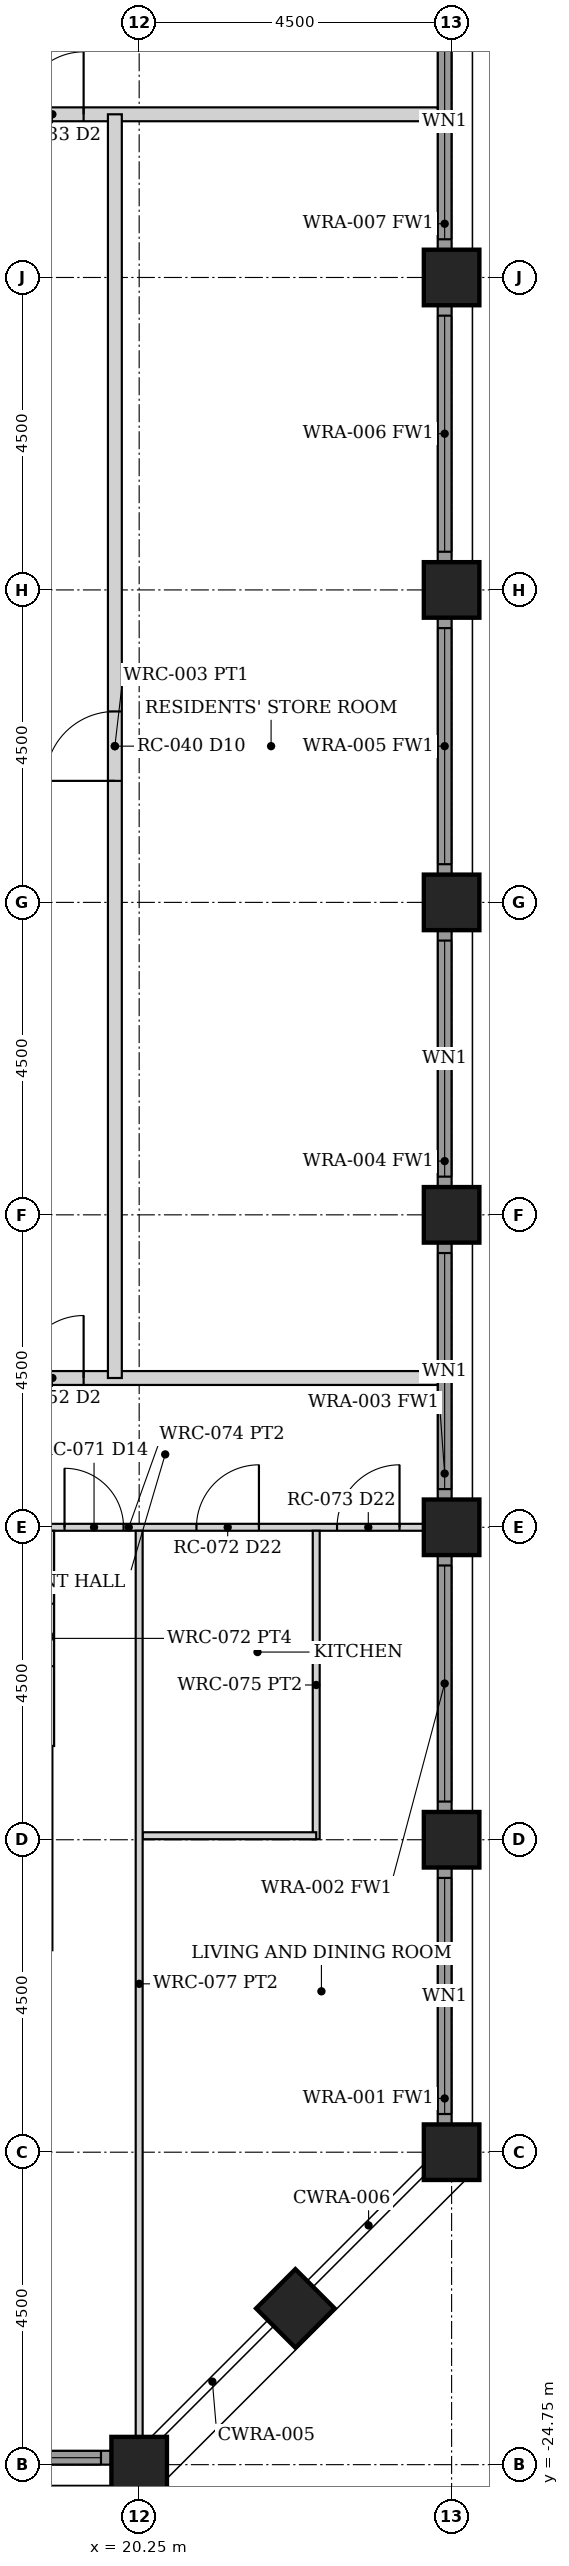
"""IFC4 building model, lengths in metres.
Left out: names, types, materials, properties, quantities, classifications, styles, units other than length and angle.
Written with IfcOpenShell. Run it as: python <this file> out.ifc"""

import sys

from ifc_helpers import new_model, si_unit, direction, frame, frame_2d, origin, origin_2d, place, context, subcontext, project, spatial, rectangle, hollow_rectangle, extrude, element, fill, save


model = new_model("IFC4")
c1 = context("Model", 3, precision=1e-05, world=origin(), true_north=direction((0.0, 1.0)))
c2 = subcontext(c1, "Body", "Model", "MODEL_VIEW")
j1 = project(units=[si_unit("LENGTHUNIT", "METRE"), si_unit("PLANEANGLEUNIT", "RADIAN")], contexts=[c1])
p1 = place(None, origin())
s1 = spatial("IfcSite", under=j1, at=p1, CompositionType="ELEMENT")
p2 = place(p1, origin())
s2 = spatial("IfcBuilding", under=s1, at=p2, CompositionType="ELEMENT")
p3 = place(p2, frame((0.0, 0.0, 47.5)))
s3 = spatial("IfcBuildingStorey", under=s2, at=p3, CompositionType="ELEMENT", Elevation=47.5)
for number, where, z_axis, x_axis in (
    (1, (24.75, -20.25, 0.0), (0.0, 0.0, 1.0), (1.0, 0.0, 0.0)),
    (2, (24.75, -15.75, 0.0), (0.0, 0.0, 1.0), (1.0, 0.0, 0.0)),
    (3, (24.75, -11.25, 0.0), (0.0, 0.0, 1.0), (1.0, 0.0, 0.0)),
    (4, (24.75, -6.75, 0.0), (0.0, 0.0, 1.0), (1.0, 0.0, 0.0)),
    (5, (24.75, -2.25, 0.0), (0.0, 0.0, 1.0), (1.0, 0.0, 0.0)),
    (6, (24.75, 2.25, 0.0), (0.0, 0.0, 1.0), (1.0, 0.0, 0.0)),
    (7, (24.75, 6.75, 0.0), (0.0, 0.0, 1.0), (1.0, 0.0, 0.0)),
    (8, (20.25, -24.75, 0.0), (0.0, 0.0, 1.0), (0.0, 1.0, 0.0)),
    (9, (22.5, -22.5, 0.0), (0.0, 0.0, 1.0), (0.707, -0.707, 0.0)),
):
    element("IfcColumn", number, at=place(p3, frame(where, z_axis=z_axis, x_axis=x_axis)), inside=s3, PredefinedType="COLUMN", context=c2, shape_type="SweptSolid", body=[
        extrude(hollow_rectangle(XDim=0.8, YDim=0.8, WallThickness=0.07, at=origin_2d()), origin(), (0.0, 0.0, 1.0), 3.5),
    ])
p4 = place(p3, frame((16.155, -24.65, 0.0), z_axis=(0.0, 0.0, 1.0), x_axis=(1.0, 0.0, 0.0)))
e10 = element("IfcWall", 10, at=p4, inside=s3, PredefinedType="SOLIDWALL", context=c2, shape_type="SweptSolid", body=[
    extrude(rectangle(XDim=3.69, YDim=0.2, at=frame_2d((1.845, 0.0))), origin(), (0.0, 0.0, 1.0), 2.379),
])
p5 = place(p4, frame((0.145, 0.0, 0.3)))
e11 = element("IfcOpeningElement", 11, at=p5, cuts=e10, PredefinedType="OPENING", context=c2, shape_type="SweptSolid", body=[
    extrude(rectangle(XDim=3.4, YDim=1.929, at=frame_2d((1.7, 0.964))), frame((0.0, 0.11, 0.0), z_axis=(0.0, -1.0, 0.0), x_axis=(1.0, 0.0, 0.0)), (0.0, 0.0, 1.0), 0.22),
])
p6 = place(p3, frame((24.65, -19.845, 0.0), z_axis=(0.0, 0.0, 1.0), x_axis=(0.0, 1.0, 0.0)))
e12 = element("IfcWall", 12, at=p6, inside=s3, PredefinedType="SOLIDWALL", context=c2, shape_type="SweptSolid", body=[
    extrude(rectangle(XDim=3.69, YDim=0.2, at=frame_2d((1.845, 0.0))), origin(), (0.0, 0.0, 1.0), 2.379),
])
p7 = place(p6, frame((0.145, 0.0, 0.3)))
e13 = element("IfcOpeningElement", 13, at=p7, cuts=e12, PredefinedType="OPENING", context=c2, shape_type="SweptSolid", body=[
    extrude(rectangle(XDim=3.4, YDim=1.929, at=frame_2d((1.7, 0.964))), frame((0.0, 0.11, 0.0), z_axis=(0.0, -1.0, 0.0), x_axis=(1.0, 0.0, 0.0)), (0.0, 0.0, 1.0), 0.22),
])
p8 = place(p3, frame((24.65, -15.345, 0.0), z_axis=(0.0, 0.0, 1.0), x_axis=(0.0, 1.0, 0.0)))
e14 = element("IfcWall", 14, at=p8, inside=s3, PredefinedType="SOLIDWALL", context=c2, shape_type="SweptSolid", body=[
    extrude(rectangle(XDim=3.69, YDim=0.2, at=frame_2d((1.845, 0.0))), origin(), (0.0, 0.0, 1.0), 2.379),
])
p9 = place(p8, frame((0.145, 0.0, 0.3)))
e15 = element("IfcOpeningElement", 15, at=p9, cuts=e14, PredefinedType="OPENING", context=c2, shape_type="SweptSolid", body=[
    extrude(rectangle(XDim=3.4, YDim=1.929, at=frame_2d((1.7, 0.964))), frame((0.0, 0.11, 0.0), z_axis=(0.0, -1.0, 0.0), x_axis=(1.0, 0.0, 0.0)), (0.0, 0.0, 1.0), 0.22),
])
p10 = place(p3, frame((24.65, -10.845, 0.0), z_axis=(0.0, 0.0, 1.0), x_axis=(0.0, 1.0, 0.0)))
e16 = element("IfcWall", 16, at=p10, inside=s3, PredefinedType="SOLIDWALL", context=c2, shape_type="SweptSolid", body=[
    extrude(rectangle(XDim=3.69, YDim=0.2, at=frame_2d((1.845, 0.0))), origin(), (0.0, 0.0, 1.0), 2.379),
])
p11 = place(p10, frame((0.145, 0.0, 0.3)))
e17 = element("IfcOpeningElement", 17, at=p11, cuts=e16, PredefinedType="OPENING", context=c2, shape_type="SweptSolid", body=[
    extrude(rectangle(XDim=3.4, YDim=1.929, at=frame_2d((1.7, 0.964))), frame((0.0, 0.11, 0.0), z_axis=(0.0, -1.0, 0.0), x_axis=(1.0, 0.0, 0.0)), (0.0, 0.0, 1.0), 0.22),
])
p12 = place(p3, frame((24.65, -6.345, 0.0), z_axis=(0.0, 0.0, 1.0), x_axis=(0.0, 1.0, 0.0)))
e18 = element("IfcWall", 18, at=p12, inside=s3, PredefinedType="SOLIDWALL", context=c2, shape_type="SweptSolid", body=[
    extrude(rectangle(XDim=3.69, YDim=0.2, at=frame_2d((1.845, 0.0))), origin(), (0.0, 0.0, 1.0), 2.379),
])
p13 = place(p12, frame((0.145, 0.0, 0.3)))
e19 = element("IfcOpeningElement", 19, at=p13, cuts=e18, PredefinedType="OPENING", context=c2, shape_type="SweptSolid", body=[
    extrude(rectangle(XDim=3.4, YDim=1.929, at=frame_2d((1.7, 0.964))), frame((0.0, 0.11, 0.0), z_axis=(0.0, -1.0, 0.0), x_axis=(1.0, 0.0, 0.0)), (0.0, 0.0, 1.0), 0.22),
])
p14 = place(p3, frame((24.65, -1.845, 0.0), z_axis=(0.0, 0.0, 1.0), x_axis=(0.0, 1.0, 0.0)))
e20 = element("IfcWall", 20, at=p14, inside=s3, PredefinedType="SOLIDWALL", context=c2, shape_type="SweptSolid", body=[
    extrude(rectangle(XDim=3.69, YDim=0.2, at=frame_2d((1.845, 0.0))), origin(), (0.0, 0.0, 1.0), 2.379),
])
p15 = place(p14, frame((0.145, 0.0, 0.3)))
e21 = element("IfcOpeningElement", 21, at=p15, cuts=e20, PredefinedType="OPENING", context=c2, shape_type="SweptSolid", body=[
    extrude(rectangle(XDim=3.4, YDim=1.929, at=frame_2d((1.7, 0.964))), frame((0.0, 0.11, 0.0), z_axis=(0.0, -1.0, 0.0), x_axis=(1.0, 0.0, 0.0)), (0.0, 0.0, 1.0), 0.22),
])
p16 = place(p3, frame((24.65, 2.655, 0.0), z_axis=(0.0, 0.0, 1.0), x_axis=(0.0, 1.0, 0.0)))
e22 = element("IfcWall", 22, at=p16, inside=s3, PredefinedType="SOLIDWALL", context=c2, shape_type="SweptSolid", body=[
    extrude(rectangle(XDim=3.69, YDim=0.2, at=frame_2d((1.845, 0.0))), origin(), (0.0, 0.0, 1.0), 2.379),
])
p17 = place(p16, frame((0.145, 0.0, 0.3)))
e23 = element("IfcOpeningElement", 23, at=p17, cuts=e22, PredefinedType="OPENING", context=c2, shape_type="SweptSolid", body=[
    extrude(rectangle(XDim=3.4, YDim=1.929, at=frame_2d((1.7, 0.964))), frame((0.0, 0.11, 0.0), z_axis=(0.0, -1.0, 0.0), x_axis=(1.0, 0.0, 0.0)), (0.0, 0.0, 1.0), 0.22),
])
p18 = place(p3, frame((24.65, 7.155, 0.0), z_axis=(0.0, 0.0, 1.0), x_axis=(0.0, 1.0, 0.0)))
e24 = element("IfcWall", 24, at=p18, inside=s3, PredefinedType="SOLIDWALL", context=c2, shape_type="SweptSolid", body=[
    extrude(rectangle(XDim=3.69, YDim=0.2, at=frame_2d((1.845, 0.0))), origin(), (0.0, 0.0, 1.0), 2.379),
])
p19 = place(p18, frame((0.145, 0.0, 0.3)))
e25 = element("IfcOpeningElement", 25, at=p19, cuts=e24, PredefinedType="OPENING", context=c2, shape_type="SweptSolid", body=[
    extrude(rectangle(XDim=3.4, YDim=1.929, at=frame_2d((1.7, 0.964))), frame((0.0, 0.11, 0.0), z_axis=(0.0, -1.0, 0.0), x_axis=(1.0, 0.0, 0.0)), (0.0, 0.0, 1.0), 0.22),
])
p20 = place(p3, frame((-24.55, 9.1, 0.0), z_axis=(0.0, 0.0, 1.0), x_axis=(1.0, 0.0, 0.0)))
e26 = element("IfcWall", 26, at=p20, inside=s3, PredefinedType="PARTITIONING", context=c2, shape_type="SweptSolid", body=[
    extrude(rectangle(XDim=49.1, YDim=0.2, at=frame_2d((24.55, 0.0))), origin(), (0.0, 0.0, 1.0), 2.373),
])
p21 = place(p20, frame((5.1, 0.0, 0.0)))
e27 = element("IfcOpeningElement", 27, at=p21, cuts=e26, PredefinedType="OPENING", context=c2, shape_type="SweptSolid", body=[
    extrude(rectangle(XDim=0.9, YDim=2.1, at=frame_2d((0.45, 1.05))), frame((0.0, 0.11, 0.0), z_axis=(0.0, -1.0, 0.0), x_axis=(1.0, 0.0, 0.0)), (0.0, 0.0, 1.0), 0.22),
])
p22 = place(p20, frame((13.6, 0.0, 0.0)))
e28 = element("IfcOpeningElement", 28, at=p22, cuts=e26, PredefinedType="OPENING", context=c2, shape_type="SweptSolid", body=[
    extrude(rectangle(XDim=0.9, YDim=2.1, at=frame_2d((0.45, 1.05))), frame((0.0, 0.11, 0.0), z_axis=(0.0, -1.0, 0.0), x_axis=(1.0, 0.0, 0.0)), (0.0, 0.0, 1.0), 0.22),
])
p23 = place(p20, frame((18.1, 0.0, 0.0)))
e29 = element("IfcOpeningElement", 29, at=p23, cuts=e26, PredefinedType="OPENING", context=c2, shape_type="SweptSolid", body=[
    extrude(rectangle(XDim=0.9, YDim=2.1, at=frame_2d((0.45, 1.05))), frame((0.0, 0.11, 0.0), z_axis=(0.0, -1.0, 0.0), x_axis=(1.0, 0.0, 0.0)), (0.0, 0.0, 1.0), 0.22),
])
p24 = place(p20, frame((31.6, 0.0, 0.0)))
e30 = element("IfcOpeningElement", 30, at=p24, cuts=e26, PredefinedType="OPENING", context=c2, shape_type="SweptSolid", body=[
    extrude(rectangle(XDim=0.9, YDim=2.1, at=frame_2d((0.45, 1.05))), frame((0.0, 0.11, 0.0), z_axis=(0.0, -1.0, 0.0), x_axis=(1.0, 0.0, 0.0)), (0.0, 0.0, 1.0), 0.22),
])
p25 = place(p20, frame((43.1, 0.0, 0.0)))
e31 = element("IfcOpeningElement", 31, at=p25, cuts=e26, PredefinedType="OPENING", context=c2, shape_type="SweptSolid", body=[
    extrude(rectangle(XDim=0.9, YDim=2.1, at=frame_2d((0.45, 1.05))), frame((0.0, 0.11, 0.0), z_axis=(0.0, -1.0, 0.0), x_axis=(1.0, 0.0, 0.0)), (0.0, 0.0, 1.0), 0.22),
])
p26 = place(p3, frame((-24.55, -9.1, 0.0), z_axis=(0.0, 0.0, 1.0), x_axis=(1.0, 0.0, 0.0)))
e32 = element("IfcWall", 32, at=p26, inside=s3, PredefinedType="PARTITIONING", context=c2, shape_type="SweptSolid", body=[
    extrude(rectangle(XDim=49.1, YDim=0.2, at=frame_2d((24.55, 0.0))), origin(), (0.0, 0.0, 1.0), 2.373),
])
p27 = place(p26, frame((5.1, 0.0, 0.0)))
e33 = element("IfcOpeningElement", 33, at=p27, cuts=e32, PredefinedType="OPENING", context=c2, shape_type="SweptSolid", body=[
    extrude(rectangle(XDim=0.9, YDim=2.1, at=frame_2d((0.45, 1.05))), frame((0.0, 0.11, 0.0), z_axis=(0.0, -1.0, 0.0), x_axis=(1.0, 0.0, 0.0)), (0.0, 0.0, 1.0), 0.22),
])
p28 = place(p26, frame((13.6, 0.0, 0.0)))
e34 = element("IfcOpeningElement", 34, at=p28, cuts=e32, PredefinedType="OPENING", context=c2, shape_type="SweptSolid", body=[
    extrude(rectangle(XDim=0.9, YDim=2.1, at=frame_2d((0.45, 1.05))), frame((0.0, 0.11, 0.0), z_axis=(0.0, -1.0, 0.0), x_axis=(1.0, 0.0, 0.0)), (0.0, 0.0, 1.0), 0.22),
])
p29 = place(p26, frame((18.1, 0.0, 0.0)))
e35 = element("IfcOpeningElement", 35, at=p29, cuts=e32, PredefinedType="OPENING", context=c2, shape_type="SweptSolid", body=[
    extrude(rectangle(XDim=0.9, YDim=2.1, at=frame_2d((0.45, 1.05))), frame((0.0, 0.11, 0.0), z_axis=(0.0, -1.0, 0.0), x_axis=(1.0, 0.0, 0.0)), (0.0, 0.0, 1.0), 0.22),
])
p30 = place(p26, frame((31.6, 0.0, 0.0)))
e36 = element("IfcOpeningElement", 36, at=p30, cuts=e32, PredefinedType="OPENING", context=c2, shape_type="SweptSolid", body=[
    extrude(rectangle(XDim=0.9, YDim=2.1, at=frame_2d((0.45, 1.05))), frame((0.0, 0.11, 0.0), z_axis=(0.0, -1.0, 0.0), x_axis=(1.0, 0.0, 0.0)), (0.0, 0.0, 1.0), 0.22),
])
p31 = place(p26, frame((43.1, 0.0, 0.0)))
e37 = element("IfcOpeningElement", 37, at=p31, cuts=e32, PredefinedType="OPENING", context=c2, shape_type="SweptSolid", body=[
    extrude(rectangle(XDim=0.9, YDim=2.1, at=frame_2d((0.45, 1.05))), frame((0.0, 0.11, 0.0), z_axis=(0.0, -1.0, 0.0), x_axis=(1.0, 0.0, 0.0)), (0.0, 0.0, 1.0), 0.22),
])
p32 = place(p3, frame((19.9, -9.1, 0.0), z_axis=(0.0, 0.0, 1.0), x_axis=(0.0, 1.0, 0.0)))
e38 = element("IfcWall", 38, at=p32, inside=s3, PredefinedType="PARTITIONING", context=c2, shape_type="SweptSolid", body=[
    extrude(rectangle(XDim=18.2, YDim=0.2, at=frame_2d((9.1, 0.0))), origin(), (0.0, 0.0, 1.0), 2.373),
])
p33 = place(p32, frame((8.6, 0.0, 0.0)))
e39 = element("IfcOpeningElement", 39, at=p33, cuts=e38, PredefinedType="OPENING", context=c2, shape_type="SweptSolid", body=[
    extrude(rectangle(XDim=1.0, YDim=2.1, at=frame_2d((0.5, 1.05))), frame((0.0, 0.11, 0.0), z_axis=(0.0, -1.0, 0.0), x_axis=(1.0, 0.0, 0.0)), (0.0, 0.0, 1.0), 0.22),
])
p34 = place(p3, frame((15.85, -11.25, 0.0), z_axis=(0.0, 0.0, 1.0), x_axis=(1.0, 0.0, 0.0)))
e40 = element("IfcWall", 40, at=p34, inside=s3, PredefinedType="PARTITIONING", context=c2, shape_type="SweptSolid", body=[
    extrude(rectangle(XDim=8.5, YDim=0.1, at=frame_2d((4.25, 0.0))), origin(), (0.0, 0.0, 1.0), 2.373),
])
p35 = place(p34, frame((5.225, 0.0, 0.0)))
e41 = element("IfcOpeningElement", 41, at=p35, cuts=e40, PredefinedType="OPENING", context=c2, shape_type="SweptSolid", body=[
    extrude(rectangle(XDim=0.9, YDim=2.1, at=frame_2d((0.45, 1.05))), frame((0.0, 0.06, 0.0), z_axis=(0.0, -1.0, 0.0), x_axis=(1.0, 0.0, 0.0)), (0.0, 0.0, 1.0), 0.12),
])
p36 = place(p34, frame((7.25, 0.0, 0.0)))
e42 = element("IfcOpeningElement", 42, at=p36, cuts=e40, PredefinedType="OPENING", context=c2, shape_type="SweptSolid", body=[
    extrude(rectangle(XDim=0.9, YDim=2.1, at=frame_2d((0.45, 1.05))), frame((0.0, 0.06, 0.0), z_axis=(0.0, -1.0, 0.0), x_axis=(1.0, 0.0, 0.0)), (0.0, 0.0, 1.0), 0.12),
])
p37 = place(p34, frame((3.325, 0.0, 0.0)))
e43 = element("IfcOpeningElement", 43, at=p37, cuts=e40, PredefinedType="OPENING", context=c2, shape_type="SweptSolid", body=[
    extrude(rectangle(XDim=0.85, YDim=2.1, at=frame_2d((0.425, 1.05))), frame((0.0, 0.06, 0.0), z_axis=(0.0, -1.0, 0.0), x_axis=(1.0, 0.0, 0.0)), (0.0, 0.0, 1.0), 0.12),
])
p38 = place(p34, frame((1.08, 0.0, 0.0)))
e44 = element("IfcOpeningElement", 44, at=p38, cuts=e40, PredefinedType="OPENING", context=c2, shape_type="SweptSolid", body=[
    extrude(rectangle(XDim=0.9, YDim=2.1, at=frame_2d((0.45, 1.05))), frame((0.0, 0.06, 0.0), z_axis=(0.0, -1.0, 0.0), x_axis=(1.0, 0.0, 0.0)), (0.0, 0.0, 1.0), 0.12),
])
p39 = place(p3, frame((22.8, -15.742, 0.0), z_axis=(0.0, 0.0, 1.0), x_axis=(0.0, 1.0, 0.0)))
e45 = element("IfcWall", 45, at=p39, inside=s3, PredefinedType="PARTITIONING", context=c2, shape_type="SweptSolid", body=[
    extrude(rectangle(XDim=4.442, YDim=0.1, at=frame_2d((2.221, 0.0))), origin(), (0.0, 0.0, 1.0), 2.373),
])
p40 = place(p3, frame((20.3, -15.692, 0.0), z_axis=(0.0, 0.0, 1.0), x_axis=(1.0, 0.0, 0.0)))
e46 = element("IfcWall", 46, at=p40, inside=s3, PredefinedType="PARTITIONING", context=c2, shape_type="SweptSolid", body=[
    extrude(rectangle(XDim=2.5, YDim=0.1, at=frame_2d((1.25, 0.0))), origin(), (0.0, 0.0, 1.0), 2.373),
])
p41 = place(p3, frame((20.25, -24.35, 0.0), z_axis=(0.0, 0.0, 1.0), x_axis=(0.0, 1.0, 0.0)))
e47 = element("IfcWall", 47, at=p41, inside=s3, PredefinedType="PARTITIONING", context=c2, shape_type="SweptSolid", body=[
    extrude(rectangle(XDim=13.05, YDim=0.1, at=frame_2d((6.525, 0.0))), origin(), (0.0, 0.0, 1.0), 2.373),
])
p42 = place(p3, frame((18.95, -14.4, 0.0), z_axis=(0.0, 0.0, 1.0), x_axis=(0.0, 1.0, 0.0)))
e48 = element("IfcWall", 48, at=p42, inside=s3, PredefinedType="PARTITIONING", context=c2, shape_type="SweptSolid", body=[
    extrude(rectangle(XDim=3.1, YDim=0.15, at=frame_2d((1.55, 0.0))), origin(), (0.0, 0.0, 1.0), 2.373),
])
p43 = place(p42, frame((1.15, 0.0, 0.0)))
e49 = element("IfcOpeningElement", 49, at=p43, cuts=e48, PredefinedType="OPENING", context=c2, shape_type="SweptSolid", body=[
    extrude(rectangle(XDim=0.9, YDim=2.1, at=frame_2d((0.45, 1.05))), frame((0.0, 0.085, 0.0), z_axis=(0.0, -1.0, 0.0), x_axis=(1.0, 0.0, 0.0)), (0.0, 0.0, 1.0), 0.17),
])
p44 = place(p5, origin())
e50 = element("IfcWindow", 50, at=p44, inside=s3, PartitioningType="SINGLE_PANEL", PredefinedType="WINDOW", context=c2, shape_type="SweptSolid", body=[
    extrude(rectangle(XDim=3.4, YDim=1.929, at=frame_2d((1.7, 0.964))), frame((0.0, 0.03, 0.0), z_axis=(0.0, -1.0, 0.0), x_axis=(1.0, 0.0, 0.0)), (0.0, 0.0, 1.0), 0.06),
])
fill(e11, e50)
p45 = place(p7, origin())
e51 = element("IfcWindow", 51, at=p45, inside=s3, PartitioningType="SINGLE_PANEL", PredefinedType="WINDOW", context=c2, shape_type="SweptSolid", body=[
    extrude(rectangle(XDim=3.4, YDim=1.929, at=frame_2d((1.7, 0.964))), frame((0.0, 0.03, 0.0), z_axis=(0.0, -1.0, 0.0), x_axis=(1.0, 0.0, 0.0)), (0.0, 0.0, 1.0), 0.06),
])
fill(e13, e51)
p46 = place(p9, origin())
e52 = element("IfcWindow", 52, at=p46, inside=s3, PartitioningType="SINGLE_PANEL", PredefinedType="WINDOW", context=c2, shape_type="SweptSolid", body=[
    extrude(rectangle(XDim=3.4, YDim=1.929, at=frame_2d((1.7, 0.964))), frame((0.0, 0.03, 0.0), z_axis=(0.0, -1.0, 0.0), x_axis=(1.0, 0.0, 0.0)), (0.0, 0.0, 1.0), 0.06),
])
fill(e15, e52)
p47 = place(p11, origin())
e53 = element("IfcWindow", 53, at=p47, inside=s3, PartitioningType="SINGLE_PANEL", PredefinedType="WINDOW", context=c2, shape_type="SweptSolid", body=[
    extrude(rectangle(XDim=3.4, YDim=1.929, at=frame_2d((1.7, 0.964))), frame((0.0, 0.03, 0.0), z_axis=(0.0, -1.0, 0.0), x_axis=(1.0, 0.0, 0.0)), (0.0, 0.0, 1.0), 0.06),
])
fill(e17, e53)
p48 = place(p13, origin())
e54 = element("IfcWindow", 54, at=p48, inside=s3, PartitioningType="SINGLE_PANEL", PredefinedType="WINDOW", context=c2, shape_type="SweptSolid", body=[
    extrude(rectangle(XDim=3.4, YDim=1.929, at=frame_2d((1.7, 0.964))), frame((0.0, 0.03, 0.0), z_axis=(0.0, -1.0, 0.0), x_axis=(1.0, 0.0, 0.0)), (0.0, 0.0, 1.0), 0.06),
])
fill(e19, e54)
p49 = place(p15, origin())
e55 = element("IfcWindow", 55, at=p49, inside=s3, PartitioningType="SINGLE_PANEL", PredefinedType="WINDOW", context=c2, shape_type="SweptSolid", body=[
    extrude(rectangle(XDim=3.4, YDim=1.929, at=frame_2d((1.7, 0.964))), frame((0.0, 0.03, 0.0), z_axis=(0.0, -1.0, 0.0), x_axis=(1.0, 0.0, 0.0)), (0.0, 0.0, 1.0), 0.06),
])
fill(e21, e55)
p50 = place(p17, origin())
e56 = element("IfcWindow", 56, at=p50, inside=s3, PartitioningType="SINGLE_PANEL", PredefinedType="WINDOW", context=c2, shape_type="SweptSolid", body=[
    extrude(rectangle(XDim=3.4, YDim=1.929, at=frame_2d((1.7, 0.964))), frame((0.0, 0.03, 0.0), z_axis=(0.0, -1.0, 0.0), x_axis=(1.0, 0.0, 0.0)), (0.0, 0.0, 1.0), 0.06),
])
fill(e23, e56)
p51 = place(p19, origin())
e57 = element("IfcWindow", 57, at=p51, inside=s3, PartitioningType="SINGLE_PANEL", PredefinedType="WINDOW", context=c2, shape_type="SweptSolid", body=[
    extrude(rectangle(XDim=3.4, YDim=1.929, at=frame_2d((1.7, 0.964))), frame((0.0, 0.03, 0.0), z_axis=(0.0, -1.0, 0.0), x_axis=(1.0, 0.0, 0.0)), (0.0, 0.0, 1.0), 0.06),
])
fill(e25, e57)
p52 = place(p25, origin())
e58 = element("IfcDoor", 58, at=p52, inside=s3, OperationType="SINGLE_SWING_RIGHT", PredefinedType="DOOR", context=c2, shape_type="SweptSolid", body=[
    extrude(rectangle(XDim=0.9, YDim=2.1, at=frame_2d((0.45, 1.05))), frame((0.0, 0.025, 0.0), z_axis=(0.0, -1.0, 0.0), x_axis=(1.0, 0.0, 0.0)), (0.0, 0.0, 1.0), 0.05),
])
fill(e31, e58)
p53 = place(p31, origin())
e59 = element("IfcDoor", 59, at=p53, inside=s3, OperationType="SINGLE_SWING_RIGHT", PredefinedType="DOOR", context=c2, shape_type="SweptSolid", body=[
    extrude(rectangle(XDim=0.9, YDim=2.1, at=frame_2d((0.45, 1.05))), frame((0.0, 0.025, 0.0), z_axis=(0.0, -1.0, 0.0), x_axis=(1.0, 0.0, 0.0)), (0.0, 0.0, 1.0), 0.05),
])
fill(e37, e59)
p54 = place(p35, origin())
e60 = element("IfcDoor", 60, at=p54, inside=s3, OperationType="SINGLE_SWING_RIGHT", PredefinedType="DOOR", context=c2, shape_type="SweptSolid", body=[
    extrude(rectangle(XDim=0.9, YDim=2.1, at=frame_2d((0.45, 1.05))), frame((0.0, 0.025, 0.0), z_axis=(0.0, -1.0, 0.0), x_axis=(1.0, 0.0, 0.0)), (0.0, 0.0, 1.0), 0.05),
])
fill(e41, e60)
p55 = place(p36, origin())
e61 = element("IfcDoor", 61, at=p55, inside=s3, OperationType="SINGLE_SWING_RIGHT", PredefinedType="DOOR", context=c2, shape_type="SweptSolid", body=[
    extrude(rectangle(XDim=0.9, YDim=2.1, at=frame_2d((0.45, 1.05))), frame((0.0, 0.025, 0.0), z_axis=(0.0, -1.0, 0.0), x_axis=(1.0, 0.0, 0.0)), (0.0, 0.0, 1.0), 0.05),
])
fill(e42, e61)
p56 = place(p37, origin())
e62 = element("IfcDoor", 62, at=p56, inside=s3, OperationType="SINGLE_SWING_LEFT", PredefinedType="DOOR", context=c2, shape_type="SweptSolid", body=[
    extrude(rectangle(XDim=0.85, YDim=2.1, at=frame_2d((0.425, 1.05))), frame((0.0, 0.025, 0.0), z_axis=(0.0, -1.0, 0.0), x_axis=(1.0, 0.0, 0.0)), (0.0, 0.0, 1.0), 0.05),
])
fill(e43, e62)
p57 = place(p33, origin())
e63 = element("IfcDoor", 63, at=p57, inside=s3, OperationType="SINGLE_SWING_LEFT", PredefinedType="DOOR", context=c2, shape_type="SweptSolid", body=[
    extrude(rectangle(XDim=1.0, YDim=2.1, at=frame_2d((0.5, 1.05))), frame((0.0, 0.025, 0.0), z_axis=(0.0, -1.0, 0.0), x_axis=(1.0, 0.0, 0.0)), (0.0, 0.0, 1.0), 0.05),
])
fill(e39, e63)
save(model, sys.argv[1])
